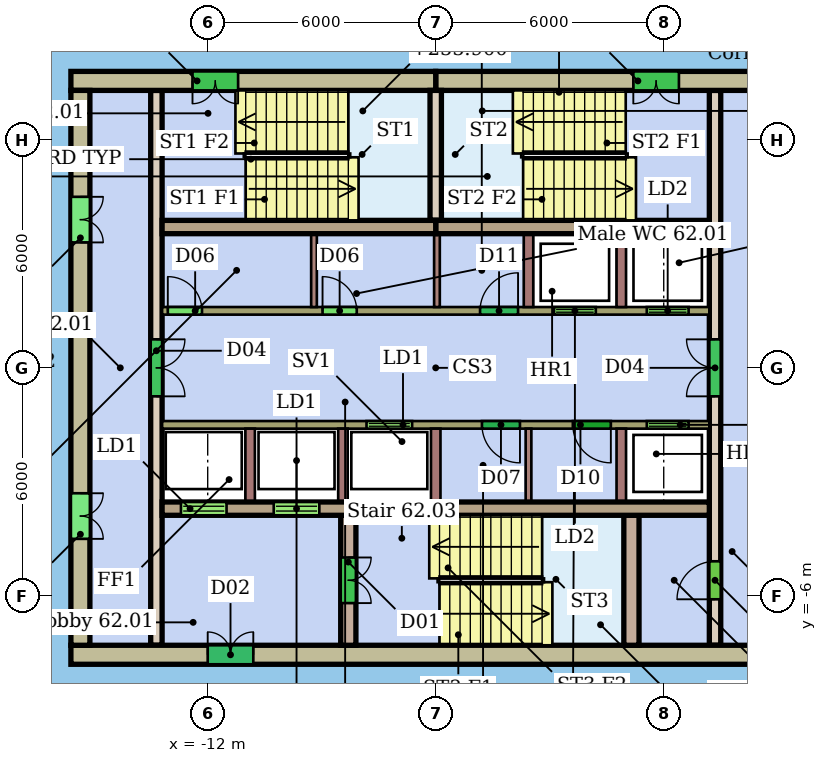
"""IFC4 building model, lengths in metres.
Left out: names, types, materials, properties, quantities, classifications, styles, units other than length and angle.
Written with IfcOpenShell. Run it as: python <this file> out.ifc"""

import sys

from ifc_helpers import new_model, si_unit, direction, frame, frame_2d, origin, place, context, subcontext, project, spatial, rectangle, extrude, element, fill, save


model = new_model("IFC4")
c1 = context("Model", 3, precision=1e-05, world=origin(), true_north=direction((0.0, 1.0)))
c2 = subcontext(c1, "Body", "Model", "MODEL_VIEW")
j1 = project(units=[si_unit("LENGTHUNIT", "METRE"), si_unit("PLANEANGLEUNIT", "RADIAN")], contexts=[c1])
p1 = place(None, origin())
s1 = spatial("IfcSite", under=j1, at=p1, CompositionType="ELEMENT")
p2 = place(p1, origin())
s2 = spatial("IfcBuilding", under=s1, at=p2, CompositionType="ELEMENT")
p3 = place(p2, frame((0.0, 0.0, 254.1)))
s3 = spatial("IfcBuildingStorey", under=s2, at=p3, CompositionType="ELEMENT", Elevation=254.1)
p4 = place(p3, frame((3.6, 7.55, 0.0), z_axis=(0.0, 0.0, 1.0), x_axis=(-1.0, 0.0, 0.0)))
e1 = element("IfcWall", 1, at=p4, inside=s3, PredefinedType="SHEAR", context=c2, shape_type="SweptSolid", body=[
    extrude(rectangle(XDim=9.6, YDim=0.5, at=frame_2d((4.8, 0.0))), origin(), (0.0, 0.0, 1.0), 3.3),
])
p5 = place(p4, frame((3.2, 0.0, 0.0)))
e2 = element("IfcOpeningElement", 2, at=p5, cuts=e1, PredefinedType="OPENING", context=c2, shape_type="SweptSolid", body=[
    extrude(rectangle(XDim=1.2, YDim=2.1, at=frame_2d((0.6, 1.05))), frame((0.0, 0.26, 0.0), z_axis=(0.0, -1.0, 0.0), x_axis=(1.0, 0.0, 0.0)), (0.0, 0.0, 1.0), 0.52),
])
p6 = place(p3, frame((-6.0, 7.55, 0.0), z_axis=(0.0, 0.0, 1.0), x_axis=(-1.0, 0.0, 0.0)))
e3 = element("IfcWall", 3, at=p6, inside=s3, PredefinedType="SHEAR", context=c2, shape_type="SweptSolid", body=[
    extrude(rectangle(XDim=9.6, YDim=0.5, at=frame_2d((4.8, 0.0))), origin(), (0.0, 0.0, 1.0), 3.3),
])
p7 = place(p6, frame((5.2, 0.0, 0.0)))
e4 = element("IfcOpeningElement", 4, at=p7, cuts=e3, PredefinedType="OPENING", context=c2, shape_type="SweptSolid", body=[
    extrude(rectangle(XDim=1.2, YDim=2.1, at=frame_2d((0.6, 1.05))), frame((0.0, 0.26, 0.0), z_axis=(0.0, -1.0, 0.0), x_axis=(1.0, 0.0, 0.0)), (0.0, 0.0, 1.0), 0.52),
])
p8 = place(p3, frame((-15.6, -7.55, 0.0), z_axis=(0.0, 0.0, 1.0), x_axis=(1.0, 0.0, 0.0)))
e5 = element("IfcWall", 5, at=p8, inside=s3, PredefinedType="SHEAR", context=c2, shape_type="SweptSolid", body=[
    extrude(rectangle(XDim=19.2, YDim=0.5, at=frame_2d((9.6, 0.0))), origin(), (0.0, 0.0, 1.0), 3.3),
])
p9 = place(p8, frame((3.6, 0.0, 0.0)))
e6 = element("IfcOpeningElement", 6, at=p9, cuts=e5, PredefinedType="OPENING", context=c2, shape_type="SweptSolid", body=[
    extrude(rectangle(XDim=1.2, YDim=2.1, at=frame_2d((0.6, 1.05))), frame((0.0, 0.26, 0.0), z_axis=(0.0, -1.0, 0.0), x_axis=(1.0, 0.0, 0.0)), (0.0, 0.0, 1.0), 0.52),
])
p10 = place(p3, frame((-15.35, 7.3, 0.0), z_axis=(0.0, 0.0, 1.0), x_axis=(0.0, -1.0, 0.0)))
e7 = element("IfcWall", 7, at=p10, inside=s3, PredefinedType="SHEAR", context=c2, shape_type="SweptSolid", body=[
    extrude(rectangle(XDim=14.6, YDim=0.5, at=frame_2d((7.3, 0.0))), origin(), (0.0, 0.0, 1.0), 3.3),
])
p11 = place(p10, frame((10.6, 0.0, 0.0)))
e8 = element("IfcOpeningElement", 8, at=p11, cuts=e7, PredefinedType="OPENING", context=c2, shape_type="SweptSolid", body=[
    extrude(rectangle(XDim=1.2, YDim=2.1, at=frame_2d((0.6, 1.05))), frame((0.0, 0.26, 0.0), z_axis=(0.0, -1.0, 0.0), x_axis=(1.0, 0.0, 0.0)), (0.0, 0.0, 1.0), 0.52),
])
p12 = place(p10, frame((2.8, 0.0, 0.0)))
e9 = element("IfcOpeningElement", 9, at=p12, cuts=e7, PredefinedType="OPENING", context=c2, shape_type="SweptSolid", body=[
    extrude(rectangle(XDim=1.2, YDim=2.1, at=frame_2d((0.6, 1.05))), frame((0.0, 0.26, 0.0), z_axis=(0.0, -1.0, 0.0), x_axis=(1.0, 0.0, 0.0)), (0.0, 0.0, 1.0), 0.52),
])
for number, where, z_axis, x_axis in (
    (10, (-13.2, 3.705, 0.0), (0.0, 0.0, 1.0), (1.0, 0.0, 0.0)),
    (11, (-6.0, 3.705, 0.0), (0.0, 0.0, 1.0), (1.0, 0.0, 0.0)),
):
    element("IfcWall", number, at=place(p3, frame(where, z_axis=z_axis, x_axis=x_axis)), inside=s3, PredefinedType="SHEAR", context=c2, shape_type="SweptSolid", body=[
        extrude(rectangle(XDim=7.2, YDim=0.35, at=frame_2d((3.6, 0.0))), origin(), (0.0, 0.0, 1.0), 3.3),
    ])
p13 = place(p3, frame((-13.2, -3.705, 0.0), z_axis=(0.0, 0.0, 1.0), x_axis=(1.0, 0.0, 0.0)))
e12 = element("IfcWall", 12, at=p13, inside=s3, PredefinedType="SHEAR", context=c2, shape_type="SweptSolid", body=[
    extrude(rectangle(XDim=7.2, YDim=0.35, at=frame_2d((3.6, 0.0))), origin(), (0.0, 0.0, 1.0), 3.3),
])
p14 = place(p13, frame((0.496, 0.0, 0.0)))
e13 = element("IfcOpeningElement", 13, at=p14, cuts=e12, PredefinedType="OPENING", context=c2, shape_type="SweptSolid", body=[
    extrude(rectangle(XDim=1.2, YDim=2.1, at=frame_2d((0.6, 1.05))), frame((0.0, 0.185, 0.0), z_axis=(0.0, -1.0, 0.0), x_axis=(1.0, 0.0, 0.0)), (0.0, 0.0, 1.0), 0.37),
])
p15 = place(p13, frame((2.938, 0.0, 0.0)))
e14 = element("IfcOpeningElement", 14, at=p15, cuts=e12, PredefinedType="OPENING", context=c2, shape_type="SweptSolid", body=[
    extrude(rectangle(XDim=1.2, YDim=2.1, at=frame_2d((0.6, 1.05))), frame((0.0, 0.185, 0.0), z_axis=(0.0, -1.0, 0.0), x_axis=(1.0, 0.0, 0.0)), (0.0, 0.0, 1.0), 0.37),
])
p16 = place(p3, frame((-6.0, -3.705, 0.0), z_axis=(0.0, 0.0, 1.0), x_axis=(1.0, 0.0, 0.0)))
e15 = element("IfcWall", 15, at=p16, inside=s3, PredefinedType="SHEAR", context=c2, shape_type="SweptSolid", body=[
    extrude(rectangle(XDim=7.2, YDim=0.35, at=frame_2d((3.6, 0.0))), origin(), (0.0, 0.0, 1.0), 3.3),
])
p17 = place(p3, frame((-13.35, 7.3, 0.0), z_axis=(0.0, 0.0, 1.0), x_axis=(0.0, -1.0, 0.0)))
e16 = element("IfcWall", 16, at=p17, inside=s3, PredefinedType="SHEAR", context=c2, shape_type="SweptSolid", body=[
    extrude(rectangle(XDim=14.6, YDim=0.3, at=frame_2d((7.3, 0.0))), origin(), (0.0, 0.0, 1.0), 3.3),
])
p18 = place(p17, frame((6.55, 0.0, 0.0)))
e17 = element("IfcOpeningElement", 17, at=p18, cuts=e16, PredefinedType="OPENING", context=c2, shape_type="SweptSolid", body=[
    extrude(rectangle(XDim=1.5, YDim=2.1, at=frame_2d((0.75, 1.05))), frame((0.0, 0.16, 0.0), z_axis=(0.0, -1.0, 0.0), x_axis=(1.0, 0.0, 0.0)), (0.0, 0.0, 1.0), 0.32),
])
p19 = place(p3, frame((1.35, -7.3, 0.0), z_axis=(0.0, 0.0, 1.0), x_axis=(0.0, 1.0, 0.0)))
e18 = element("IfcWall", 18, at=p19, inside=s3, PredefinedType="SHEAR", context=c2, shape_type="SweptSolid", body=[
    extrude(rectangle(XDim=14.6, YDim=0.3, at=frame_2d((7.3, 0.0))), origin(), (0.0, 0.0, 1.0), 3.3),
])
p20 = place(p19, frame((1.21, 0.0, 0.0)))
e19 = element("IfcOpeningElement", 19, at=p20, cuts=e18, PredefinedType="OPENING", context=c2, shape_type="SweptSolid", body=[
    extrude(rectangle(XDim=1.0, YDim=2.1, at=frame_2d((0.5, 1.05))), frame((0.0, 0.16, 0.0), z_axis=(0.0, -1.0, 0.0), x_axis=(1.0, 0.0, 0.0)), (0.0, 0.0, 1.0), 0.32),
])
p21 = place(p19, frame((6.55, 0.0, 0.0)))
e20 = element("IfcOpeningElement", 20, at=p21, cuts=e18, PredefinedType="OPENING", context=c2, shape_type="SweptSolid", body=[
    extrude(rectangle(XDim=1.5, YDim=2.1, at=frame_2d((0.75, 1.05))), frame((0.0, 0.16, 0.0), z_axis=(0.0, -1.0, 0.0), x_axis=(1.0, 0.0, 0.0)), (0.0, 0.0, 1.0), 0.32),
])
p22 = place(p3, frame((-13.2, 1.5, 0.0), z_axis=(0.0, 0.0, 1.0), x_axis=(1.0, 0.0, 0.0)))
e21 = element("IfcWall", 21, at=p22, inside=s3, PredefinedType="SHEAR", context=c2, shape_type="SweptSolid", body=[
    extrude(rectangle(XDim=14.4, YDim=0.2, at=frame_2d((7.2, 0.0))), origin(), (0.0, 0.0, 1.0), 3.3),
])
p23 = place(p22, frame((10.312, 0.0, 0.0)))
e22 = element("IfcOpeningElement", 22, at=p23, cuts=e21, PredefinedType="OPENING", context=c2, shape_type="SweptSolid", body=[
    extrude(rectangle(XDim=1.1, YDim=2.1, at=frame_2d((0.55, 1.05))), frame((0.0, 0.11, 0.0), z_axis=(0.0, -1.0, 0.0), x_axis=(1.0, 0.0, 0.0)), (0.0, 0.0, 1.0), 0.22),
])
p24 = place(p22, frame((12.754, 0.0, 0.0)))
e23 = element("IfcOpeningElement", 23, at=p24, cuts=e21, PredefinedType="OPENING", context=c2, shape_type="SweptSolid", body=[
    extrude(rectangle(XDim=1.1, YDim=2.1, at=frame_2d((0.55, 1.05))), frame((0.0, 0.11, 0.0), z_axis=(0.0, -1.0, 0.0), x_axis=(1.0, 0.0, 0.0)), (0.0, 0.0, 1.0), 0.22),
])
p25 = place(p22, frame((0.15, 0.0, 0.0)))
e24 = element("IfcOpeningElement", 24, at=p25, cuts=e21, PredefinedType="OPENING", context=c2, shape_type="SweptSolid", body=[
    extrude(rectangle(XDim=0.9, YDim=2.1, at=frame_2d((0.45, 1.05))), frame((0.0, 0.11, 0.0), z_axis=(0.0, -1.0, 0.0), x_axis=(1.0, 0.0, 0.0)), (0.0, 0.0, 1.0), 0.22),
])
p26 = place(p22, frame((4.222, 0.0, 0.0)))
e25 = element("IfcOpeningElement", 25, at=p26, cuts=e21, PredefinedType="OPENING", context=c2, shape_type="SweptSolid", body=[
    extrude(rectangle(XDim=0.9, YDim=2.1, at=frame_2d((0.45, 1.05))), frame((0.0, 0.11, 0.0), z_axis=(0.0, -1.0, 0.0), x_axis=(1.0, 0.0, 0.0)), (0.0, 0.0, 1.0), 0.22),
])
p27 = place(p22, frame((8.367, 0.0, 0.0)))
e26 = element("IfcOpeningElement", 26, at=p27, cuts=e21, PredefinedType="OPENING", context=c2, shape_type="SweptSolid", body=[
    extrude(rectangle(XDim=1.0, YDim=2.1, at=frame_2d((0.5, 1.05))), frame((0.0, 0.11, 0.0), z_axis=(0.0, -1.0, 0.0), x_axis=(1.0, 0.0, 0.0)), (0.0, 0.0, 1.0), 0.22),
])
p28 = place(p3, frame((1.2, -1.5, 0.0), z_axis=(0.0, 0.0, 1.0), x_axis=(-1.0, 0.0, 0.0)))
e27 = element("IfcWall", 27, at=p28, inside=s3, PredefinedType="SHEAR", context=c2, shape_type="SweptSolid", body=[
    extrude(rectangle(XDim=14.4, YDim=0.2, at=frame_2d((7.2, 0.0))), origin(), (0.0, 0.0, 1.0), 3.3),
])
p29 = place(p28, frame((7.821, 0.0, 0.0)))
e28 = element("IfcOpeningElement", 28, at=p29, cuts=e27, PredefinedType="OPENING", context=c2, shape_type="SweptSolid", body=[
    extrude(rectangle(XDim=1.2, YDim=2.1, at=frame_2d((0.6, 1.05))), frame((0.0, 0.11, 0.0), z_axis=(0.0, -1.0, 0.0), x_axis=(1.0, 0.0, 0.0)), (0.0, 0.0, 1.0), 0.22),
])
p30 = place(p28, frame((0.546, 0.0, 0.0)))
e29 = element("IfcOpeningElement", 29, at=p30, cuts=e27, PredefinedType="OPENING", context=c2, shape_type="SweptSolid", body=[
    extrude(rectangle(XDim=1.1, YDim=2.1, at=frame_2d((0.55, 1.05))), frame((0.0, 0.11, 0.0), z_axis=(0.0, -1.0, 0.0), x_axis=(1.0, 0.0, 0.0)), (0.0, 0.0, 1.0), 0.22),
])
p31 = place(p28, frame((4.983, 0.0, 0.0)))
e30 = element("IfcOpeningElement", 30, at=p31, cuts=e27, PredefinedType="OPENING", context=c2, shape_type="SweptSolid", body=[
    extrude(rectangle(XDim=1.0, YDim=2.1, at=frame_2d((0.5, 1.05))), frame((0.0, 0.11, 0.0), z_axis=(0.0, -1.0, 0.0), x_axis=(1.0, 0.0, 0.0)), (0.0, 0.0, 1.0), 0.22),
])
p32 = place(p28, frame((2.592, 0.0, 0.0)))
e31 = element("IfcOpeningElement", 31, at=p32, cuts=e27, PredefinedType="OPENING", context=c2, shape_type="SweptSolid", body=[
    extrude(rectangle(XDim=1.0, YDim=2.1, at=frame_2d((0.5, 1.05))), frame((0.0, 0.11, 0.0), z_axis=(0.0, -1.0, 0.0), x_axis=(1.0, 0.0, 0.0)), (0.0, 0.0, 1.0), 0.22),
])
p33 = place(p3, frame((-8.3, -3.88, 0.0), z_axis=(0.0, 0.0, 1.0), x_axis=(0.0, -1.0, 0.0)))
e32 = element("IfcWall", 32, at=p33, inside=s3, PredefinedType="SHEAR", context=c2, shape_type="SweptSolid", body=[
    extrude(rectangle(XDim=3.42, YDim=0.4, at=frame_2d((1.71, 0.0))), origin(), (0.0, 0.0, 1.0), 3.3),
])
p34 = place(p33, frame((1.11, 0.0, 0.0)))
e33 = element("IfcOpeningElement", 33, at=p34, cuts=e32, PredefinedType="OPENING", context=c2, shape_type="SweptSolid", body=[
    extrude(rectangle(XDim=1.2, YDim=2.1, at=frame_2d((0.6, 1.05))), frame((0.0, 0.21, 0.0), z_axis=(0.0, -1.0, 0.0), x_axis=(1.0, 0.0, 0.0)), (0.0, 0.0, 1.0), 0.42),
])
p35 = place(p3, frame((-0.85, -3.88, 0.0), z_axis=(0.0, 0.0, 1.0), x_axis=(0.0, -1.0, 0.0)))
e34 = element("IfcWall", 34, at=p35, inside=s3, PredefinedType="SHEAR", context=c2, shape_type="SweptSolid", body=[
    extrude(rectangle(XDim=3.42, YDim=0.4, at=frame_2d((1.71, 0.0))), origin(), (0.0, 0.0, 1.0), 3.3),
])
p36 = place(p3, frame((-6.0, 3.88, 0.0), z_axis=(0.0, 0.0, 1.0), x_axis=(0.0, 1.0, 0.0)))
e35 = element("IfcWall", 35, at=p36, inside=s3, PredefinedType="SHEAR", context=c2, shape_type="SweptSolid", body=[
    extrude(rectangle(XDim=3.42, YDim=0.3, at=frame_2d((1.71, 0.0))), origin(), (0.0, 0.0, 1.0), 3.3),
])
for number, where, z_axis, x_axis in (
    (36, (-3.558, 1.6, 0.0), (0.0, 0.0, 1.0), (0.0, 1.0, 0.0)),
    (37, (-1.117, 1.6, 0.0), (0.0, 0.0, 1.0), (0.0, 1.0, 0.0)),
):
    element("IfcWall", number, at=place(p3, frame(where, z_axis=z_axis, x_axis=x_axis)), inside=s3, PredefinedType="SHEAR", context=c2, shape_type="SweptSolid", body=[
        extrude(rectangle(XDim=1.93, YDim=0.25, at=frame_2d((0.965, 0.0))), origin(), (0.0, 0.0, 1.0), 3.3),
    ])
for number, where, z_axis, x_axis in (
    (38, (-9.203, 1.6, 0.0), (0.0, 0.0, 1.0), (0.0, 1.0, 0.0)),
    (39, (-5.967, 1.6, 0.0), (0.0, 0.0, 1.0), (0.0, 1.0, 0.0)),
):
    element("IfcWall", number, at=place(p3, frame(where, z_axis=z_axis, x_axis=x_axis)), inside=s3, PredefinedType="PARTITIONING", context=c2, shape_type="SweptSolid", body=[
        extrude(rectangle(XDim=1.93, YDim=0.15, at=frame_2d((0.965, 0.0))), origin(), (0.0, 0.0, 1.0), 3.3),
    ])
for number, where, z_axis, x_axis in (
    (40, (-10.883, -1.6, 0.0), (0.0, 0.0, 1.0), (0.0, -1.0, 0.0)),
    (41, (-8.442, -1.6, 0.0), (0.0, 0.0, 1.0), (0.0, -1.0, 0.0)),
    (42, (-6.0, -1.6, 0.0), (0.0, 0.0, 1.0), (0.0, -1.0, 0.0)),
    (43, (-1.117, -1.6, 0.0), (0.0, 0.0, 1.0), (0.0, -1.0, 0.0)),
):
    element("IfcWall", number, at=place(p3, frame(where, z_axis=z_axis, x_axis=x_axis)), inside=s3, PredefinedType="SHEAR", context=c2, shape_type="SweptSolid", body=[
        extrude(rectangle(XDim=1.93, YDim=0.25, at=frame_2d((0.965, 0.0))), origin(), (0.0, 0.0, 1.0), 3.3),
    ])
p37 = place(p3, frame((-3.558, -1.6, 0.0), z_axis=(0.0, 0.0, 1.0), x_axis=(0.0, -1.0, 0.0)))
e44 = element("IfcWall", 44, at=p37, inside=s3, PredefinedType="PARTITIONING", context=c2, shape_type="SweptSolid", body=[
    extrude(rectangle(XDim=1.93, YDim=0.15, at=frame_2d((0.965, 0.0))), origin(), (0.0, 0.0, 1.0), 3.3),
])
p38 = place(p5, origin())
e45 = element("IfcDoor", 45, at=p38, inside=s3, OperationType="DOUBLE_DOOR_SINGLE_SWING", PredefinedType="NOTDEFINED", context=c2, shape_type="SweptSolid", body=[
    extrude(rectangle(XDim=1.2, YDim=2.1, at=frame_2d((0.6, 1.05))), frame((0.0, 0.025, 0.0), z_axis=(0.0, -1.0, 0.0), x_axis=(1.0, 0.0, 0.0)), (0.0, 0.0, 1.0), 0.05),
])
fill(e2, e45)
p39 = place(p7, origin())
e46 = element("IfcDoor", 46, at=p39, inside=s3, OperationType="DOUBLE_DOOR_SINGLE_SWING", PredefinedType="NOTDEFINED", context=c2, shape_type="SweptSolid", body=[
    extrude(rectangle(XDim=1.2, YDim=2.1, at=frame_2d((0.6, 1.05))), frame((0.0, 0.025, 0.0), z_axis=(0.0, -1.0, 0.0), x_axis=(1.0, 0.0, 0.0)), (0.0, 0.0, 1.0), 0.05),
])
fill(e4, e46)
p40 = place(p9, origin())
e47 = element("IfcDoor", 47, at=p40, inside=s3, OperationType="DOUBLE_DOOR_SINGLE_SWING", PredefinedType="NOTDEFINED", context=c2, shape_type="SweptSolid", body=[
    extrude(rectangle(XDim=1.2, YDim=2.1, at=frame_2d((0.6, 1.05))), frame((0.0, 0.025, 0.0), z_axis=(0.0, -1.0, 0.0), x_axis=(1.0, 0.0, 0.0)), (0.0, 0.0, 1.0), 0.05),
])
fill(e6, e47)
p41 = place(p11, origin())
e48 = element("IfcDoor", 48, at=p41, inside=s3, OperationType="DOUBLE_DOOR_SINGLE_SWING", PredefinedType="NOTDEFINED", context=c2, shape_type="SweptSolid", body=[
    extrude(rectangle(XDim=1.2, YDim=2.1, at=frame_2d((0.6, 1.05))), frame((0.0, 0.025, 0.0), z_axis=(0.0, -1.0, 0.0), x_axis=(1.0, 0.0, 0.0)), (0.0, 0.0, 1.0), 0.05),
])
fill(e8, e48)
p42 = place(p12, origin())
e49 = element("IfcDoor", 49, at=p42, inside=s3, OperationType="DOUBLE_DOOR_SINGLE_SWING", PredefinedType="NOTDEFINED", context=c2, shape_type="SweptSolid", body=[
    extrude(rectangle(XDim=1.2, YDim=2.1, at=frame_2d((0.6, 1.05))), frame((0.0, 0.025, 0.0), z_axis=(0.0, -1.0, 0.0), x_axis=(1.0, 0.0, 0.0)), (0.0, 0.0, 1.0), 0.05),
])
fill(e9, e49)
p43 = place(p14, origin())
e50 = element("IfcDoor", 50, at=p43, inside=s3, OperationType="DOUBLE_DOOR_SLIDING", PredefinedType="NOTDEFINED", context=c2, shape_type="SweptSolid", body=[
    extrude(rectangle(XDim=1.2, YDim=2.1, at=frame_2d((0.6, 1.05))), frame((0.0, 0.025, 0.0), z_axis=(0.0, -1.0, 0.0), x_axis=(1.0, 0.0, 0.0)), (0.0, 0.0, 1.0), 0.05),
])
fill(e13, e50)
p44 = place(p15, origin())
e51 = element("IfcDoor", 51, at=p44, inside=s3, OperationType="DOUBLE_DOOR_SLIDING", PredefinedType="NOTDEFINED", context=c2, shape_type="SweptSolid", body=[
    extrude(rectangle(XDim=1.2, YDim=2.1, at=frame_2d((0.6, 1.05))), frame((0.0, 0.025, 0.0), z_axis=(0.0, -1.0, 0.0), x_axis=(1.0, 0.0, 0.0)), (0.0, 0.0, 1.0), 0.05),
])
fill(e14, e51)
p45 = place(p18, origin())
e52 = element("IfcDoor", 52, at=p45, inside=s3, OperationType="DOUBLE_DOOR_SINGLE_SWING", PredefinedType="NOTDEFINED", context=c2, shape_type="SweptSolid", body=[
    extrude(rectangle(XDim=1.5, YDim=2.1, at=frame_2d((0.75, 1.05))), frame((0.0, 0.025, 0.0), z_axis=(0.0, -1.0, 0.0), x_axis=(1.0, 0.0, 0.0)), (0.0, 0.0, 1.0), 0.05),
])
fill(e17, e52)
p46 = place(p20, origin())
e53 = element("IfcDoor", 53, at=p46, inside=s3, OperationType="SINGLE_SWING_LEFT", PredefinedType="NOTDEFINED", context=c2, shape_type="SweptSolid", body=[
    extrude(rectangle(XDim=1.0, YDim=2.1, at=frame_2d((0.5, 1.05))), frame((0.0, 0.025, 0.0), z_axis=(0.0, -1.0, 0.0), x_axis=(1.0, 0.0, 0.0)), (0.0, 0.0, 1.0), 0.05),
])
fill(e19, e53)
p47 = place(p21, origin())
e54 = element("IfcDoor", 54, at=p47, inside=s3, OperationType="DOUBLE_DOOR_SINGLE_SWING", PredefinedType="NOTDEFINED", context=c2, shape_type="SweptSolid", body=[
    extrude(rectangle(XDim=1.5, YDim=2.1, at=frame_2d((0.75, 1.05))), frame((0.0, 0.025, 0.0), z_axis=(0.0, -1.0, 0.0), x_axis=(1.0, 0.0, 0.0)), (0.0, 0.0, 1.0), 0.05),
])
fill(e20, e54)
p48 = place(p23, origin())
e55 = element("IfcDoor", 55, at=p48, inside=s3, OperationType="DOUBLE_DOOR_SLIDING", PredefinedType="NOTDEFINED", context=c2, shape_type="SweptSolid", body=[
    extrude(rectangle(XDim=1.1, YDim=2.1, at=frame_2d((0.55, 1.05))), frame((0.0, 0.025, 0.0), z_axis=(0.0, -1.0, 0.0), x_axis=(1.0, 0.0, 0.0)), (0.0, 0.0, 1.0), 0.05),
])
fill(e22, e55)
p49 = place(p24, origin())
e56 = element("IfcDoor", 56, at=p49, inside=s3, OperationType="DOUBLE_DOOR_SLIDING", PredefinedType="NOTDEFINED", context=c2, shape_type="SweptSolid", body=[
    extrude(rectangle(XDim=1.1, YDim=2.1, at=frame_2d((0.55, 1.05))), frame((0.0, 0.025, 0.0), z_axis=(0.0, -1.0, 0.0), x_axis=(1.0, 0.0, 0.0)), (0.0, 0.0, 1.0), 0.05),
])
fill(e23, e56)
p50 = place(p25, origin())
e57 = element("IfcDoor", 57, at=p50, inside=s3, OperationType="SINGLE_SWING_LEFT", PredefinedType="NOTDEFINED", context=c2, shape_type="SweptSolid", body=[
    extrude(rectangle(XDim=0.9, YDim=2.1, at=frame_2d((0.45, 1.05))), frame((0.0, 0.025, 0.0), z_axis=(0.0, -1.0, 0.0), x_axis=(1.0, 0.0, 0.0)), (0.0, 0.0, 1.0), 0.05),
])
fill(e24, e57)
p51 = place(p26, origin())
e58 = element("IfcDoor", 58, at=p51, inside=s3, OperationType="SINGLE_SWING_LEFT", PredefinedType="NOTDEFINED", context=c2, shape_type="SweptSolid", body=[
    extrude(rectangle(XDim=0.9, YDim=2.1, at=frame_2d((0.45, 1.05))), frame((0.0, 0.025, 0.0), z_axis=(0.0, -1.0, 0.0), x_axis=(1.0, 0.0, 0.0)), (0.0, 0.0, 1.0), 0.05),
])
fill(e25, e58)
p52 = place(p27, origin())
e59 = element("IfcDoor", 59, at=p52, inside=s3, OperationType="SINGLE_SWING_RIGHT", PredefinedType="NOTDEFINED", context=c2, shape_type="SweptSolid", body=[
    extrude(rectangle(XDim=1.0, YDim=2.1, at=frame_2d((0.5, 1.05))), frame((0.0, 0.025, 0.0), z_axis=(0.0, -1.0, 0.0), x_axis=(1.0, 0.0, 0.0)), (0.0, 0.0, 1.0), 0.05),
])
fill(e26, e59)
p53 = place(p29, origin())
e60 = element("IfcDoor", 60, at=p53, inside=s3, OperationType="DOUBLE_DOOR_SLIDING", PredefinedType="NOTDEFINED", context=c2, shape_type="SweptSolid", body=[
    extrude(rectangle(XDim=1.2, YDim=2.1, at=frame_2d((0.6, 1.05))), frame((0.0, 0.025, 0.0), z_axis=(0.0, -1.0, 0.0), x_axis=(1.0, 0.0, 0.0)), (0.0, 0.0, 1.0), 0.05),
])
fill(e28, e60)
p54 = place(p30, origin())
e61 = element("IfcDoor", 61, at=p54, inside=s3, OperationType="DOUBLE_DOOR_SLIDING", PredefinedType="NOTDEFINED", context=c2, shape_type="SweptSolid", body=[
    extrude(rectangle(XDim=1.1, YDim=2.1, at=frame_2d((0.55, 1.05))), frame((0.0, 0.025, 0.0), z_axis=(0.0, -1.0, 0.0), x_axis=(1.0, 0.0, 0.0)), (0.0, 0.0, 1.0), 0.05),
])
fill(e29, e61)
p55 = place(p31, origin())
e62 = element("IfcDoor", 62, at=p55, inside=s3, OperationType="SINGLE_SWING_LEFT", PredefinedType="NOTDEFINED", context=c2, shape_type="SweptSolid", body=[
    extrude(rectangle(XDim=1.0, YDim=2.1, at=frame_2d((0.5, 1.05))), frame((0.0, 0.025, 0.0), z_axis=(0.0, -1.0, 0.0), x_axis=(1.0, 0.0, 0.0)), (0.0, 0.0, 1.0), 0.05),
])
fill(e30, e62)
p56 = place(p32, origin())
e63 = element("IfcDoor", 63, at=p56, inside=s3, OperationType="SINGLE_SWING_LEFT", PredefinedType="NOTDEFINED", context=c2, shape_type="SweptSolid", body=[
    extrude(rectangle(XDim=1.0, YDim=2.1, at=frame_2d((0.5, 1.05))), frame((0.0, 0.025, 0.0), z_axis=(0.0, -1.0, 0.0), x_axis=(1.0, 0.0, 0.0)), (0.0, 0.0, 1.0), 0.05),
])
fill(e31, e63)
p57 = place(p34, origin())
e64 = element("IfcDoor", 64, at=p57, inside=s3, OperationType="DOUBLE_DOOR_SINGLE_SWING", PredefinedType="NOTDEFINED", context=c2, shape_type="SweptSolid", body=[
    extrude(rectangle(XDim=1.2, YDim=2.1, at=frame_2d((0.6, 1.05))), frame((0.0, 0.025, 0.0), z_axis=(0.0, -1.0, 0.0), x_axis=(1.0, 0.0, 0.0)), (0.0, 0.0, 1.0), 0.05),
])
fill(e33, e64)
save(model, sys.argv[1])
